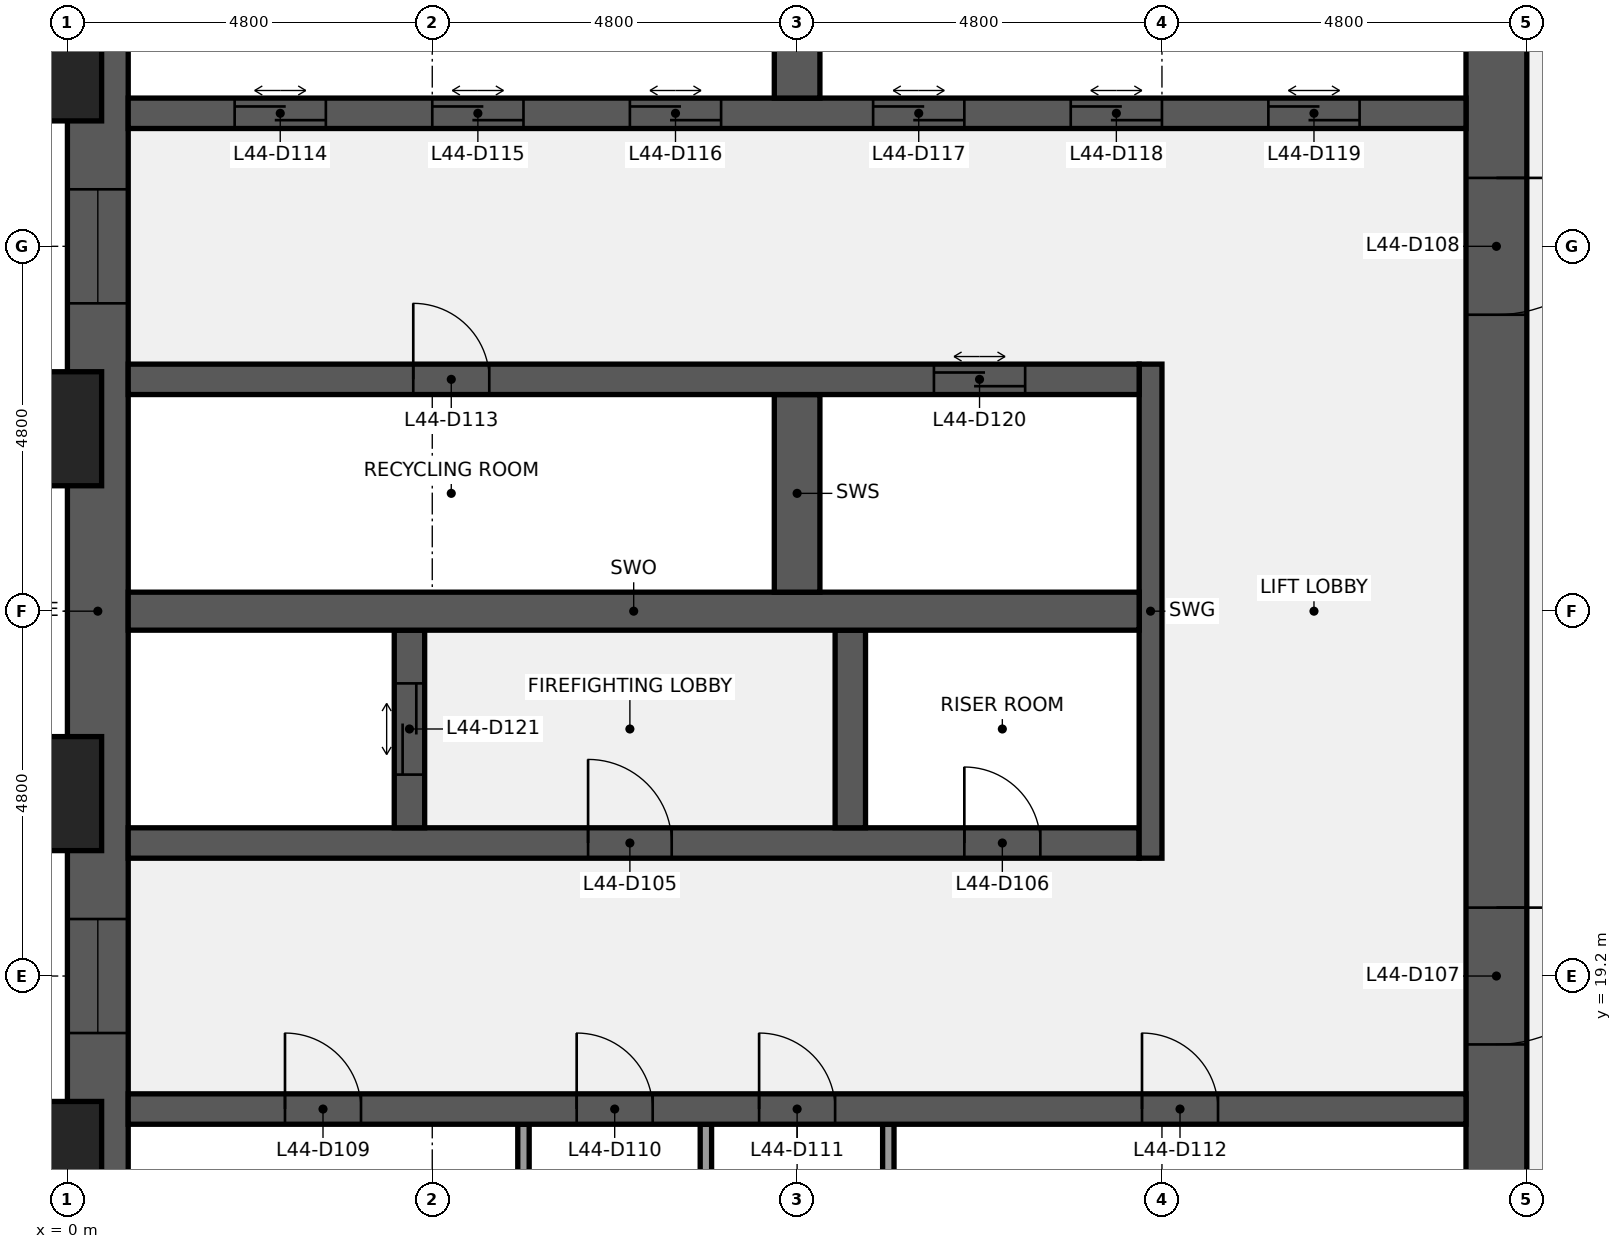
"""IFC4 building model, lengths in metres.
Left out: names, types, materials, properties, quantities, classifications, styles, units other than length and angle.
Written with IfcOpenShell. Run it as: python <this file> out.ifc"""

import sys

from ifc_helpers import new_model, si_unit, direction, frame, frame_2d, origin, origin_2d, place, context, subcontext, project, spatial, rectangle, extrude, element, fill, save


model = new_model("IFC4")
c1 = context("Model", 3, precision=1e-05, world=origin(), true_north=direction((0.0, 1.0)))
c2 = subcontext(c1, "Body", "Model", "MODEL_VIEW")
j1 = project(units=[si_unit("LENGTHUNIT", "METRE"), si_unit("PLANEANGLEUNIT", "RADIAN")], contexts=[c1])
p1 = place(None, origin())
s1 = spatial("IfcSite", under=j1, at=p1, CompositionType="ELEMENT")
p2 = place(p1, origin())
s2 = spatial("IfcBuilding", under=s1, at=p2, CompositionType="ELEMENT")
p3 = place(p2, frame((0.0, 0.0, 205.2)))
s3 = spatial("IfcBuildingStorey", under=s2, at=p3, CompositionType="ELEMENT", Elevation=205.2)
p4 = place(p3, frame((0.4, 9.6, 0.0), z_axis=(0.0, 0.0, 1.0), x_axis=(0.0, 1.0, 0.0)))
e1 = element("IfcWall", 1, at=p4, inside=s3, PredefinedType="SHEAR", context=c2, shape_type="SweptSolid", body=[
    extrude(rectangle(XDim=28.8, YDim=0.8, at=frame_2d((14.4, 0.0))), origin(), (0.0, 0.0, 1.0), 3.84),
])
p5 = place(p4, frame((8.85, 0.0, 0.9)))
e2 = element("IfcOpeningElement", 2, at=p5, cuts=e1, PredefinedType="OPENING", context=c2, shape_type="SweptSolid", body=[
    extrude(rectangle(XDim=1.5, YDim=1.5, at=frame_2d((0.75, 0.75))), frame((0.0, 0.41, 0.0), z_axis=(0.0, -1.0, 0.0), x_axis=(1.0, 0.0, 0.0)), (0.0, 0.0, 1.0), 0.82),
])
p6 = place(p4, frame((18.45, 0.0, 0.9)))
e3 = element("IfcOpeningElement", 3, at=p6, cuts=e1, PredefinedType="OPENING", context=c2, shape_type="SweptSolid", body=[
    extrude(rectangle(XDim=1.5, YDim=1.5, at=frame_2d((0.75, 0.75))), frame((0.0, 0.41, 0.0), z_axis=(0.0, -1.0, 0.0), x_axis=(1.0, 0.0, 0.0)), (0.0, 0.0, 1.0), 0.82),
])
p7 = place(p3, frame((18.8, 38.4, 0.0), z_axis=(0.0, 0.0, 1.0), x_axis=(0.0, -1.0, 0.0)))
e4 = element("IfcWall", 4, at=p7, inside=s3, PredefinedType="SHEAR", context=c2, shape_type="SweptSolid", body=[
    extrude(rectangle(XDim=28.8, YDim=0.8, at=frame_2d((14.4, 0.0))), origin(), (0.0, 0.0, 1.0), 3.84),
])
p8 = place(p7, frame((18.3, 0.0, 0.0)))
e5 = element("IfcOpeningElement", 5, at=p8, cuts=e4, PredefinedType="OPENING", context=c2, shape_type="SweptSolid", body=[
    extrude(rectangle(XDim=1.8, YDim=2.1, at=frame_2d((0.9, 1.05))), frame((0.0, 0.41, 0.0), z_axis=(0.0, -1.0, 0.0), x_axis=(1.0, 0.0, 0.0)), (0.0, 0.0, 1.0), 0.82),
])
p9 = place(p7, frame((8.7, 0.0, 0.0)))
e6 = element("IfcOpeningElement", 6, at=p9, cuts=e4, PredefinedType="OPENING", context=c2, shape_type="SweptSolid", body=[
    extrude(rectangle(XDim=1.8, YDim=2.1, at=frame_2d((0.9, 1.05))), frame((0.0, 0.41, 0.0), z_axis=(0.0, -1.0, 0.0), x_axis=(1.0, 0.0, 0.0)), (0.0, 0.0, 1.0), 0.82),
])
for number, where, z_axis, x_axis in (
    (7, (6.0, 14.65, 0.0), (0.0, 0.0, 1.0), (0.0, 1.0, 0.0)),
    (8, (8.4, 14.65, 0.0), (0.0, 0.0, 1.0), (0.0, 1.0, 0.0)),
    (9, (10.8, 14.65, 0.0), (0.0, 0.0, 1.0), (0.0, 1.0, 0.0)),
):
    element("IfcWall", number, at=place(p3, frame(where, z_axis=z_axis, x_axis=x_axis)), inside=s3, PredefinedType="PARTITIONING", context=c2, shape_type="SweptSolid", body=[
        extrude(rectangle(XDim=2.6, YDim=0.15, at=frame_2d((1.3, 0.0))), origin(), (0.0, 0.0, 1.0), 3.84),
    ])
p10 = place(p3, frame((0.8, 17.45, 0.0), z_axis=(0.0, 0.0, 1.0), x_axis=(1.0, 0.0, 0.0)))
e10 = element("IfcWall", 10, at=p10, inside=s3, PredefinedType="SHEAR", context=c2, shape_type="SweptSolid", body=[
    extrude(rectangle(XDim=17.6, YDim=0.4, at=frame_2d((8.8, 0.0))), origin(), (0.0, 0.0, 1.0), 3.84),
])
p11 = place(p10, frame((2.062, 0.0, 0.0)))
e11 = element("IfcOpeningElement", 11, at=p11, cuts=e10, PredefinedType="OPENING", context=c2, shape_type="SweptSolid", body=[
    extrude(rectangle(XDim=1.0, YDim=2.1, at=frame_2d((0.5, 1.05))), frame((0.0, 0.21, 0.0), z_axis=(0.0, -1.0, 0.0), x_axis=(1.0, 0.0, 0.0)), (0.0, 0.0, 1.0), 0.42),
])
p12 = place(p10, frame((5.9, 0.0, 0.0)))
e12 = element("IfcOpeningElement", 12, at=p12, cuts=e10, PredefinedType="OPENING", context=c2, shape_type="SweptSolid", body=[
    extrude(rectangle(XDim=1.0, YDim=2.1, at=frame_2d((0.5, 1.05))), frame((0.0, 0.21, 0.0), z_axis=(0.0, -1.0, 0.0), x_axis=(1.0, 0.0, 0.0)), (0.0, 0.0, 1.0), 0.42),
])
p13 = place(p10, frame((8.3, 0.0, 0.0)))
e13 = element("IfcOpeningElement", 13, at=p13, cuts=e10, PredefinedType="OPENING", context=c2, shape_type="SweptSolid", body=[
    extrude(rectangle(XDim=1.0, YDim=2.1, at=frame_2d((0.5, 1.05))), frame((0.0, 0.21, 0.0), z_axis=(0.0, -1.0, 0.0), x_axis=(1.0, 0.0, 0.0)), (0.0, 0.0, 1.0), 0.42),
])
p14 = place(p10, frame((13.337, 0.0, 0.0)))
e14 = element("IfcOpeningElement", 14, at=p14, cuts=e10, PredefinedType="OPENING", context=c2, shape_type="SweptSolid", body=[
    extrude(rectangle(XDim=1.0, YDim=2.1, at=frame_2d((0.5, 1.05))), frame((0.0, 0.21, 0.0), z_axis=(0.0, -1.0, 0.0), x_axis=(1.0, 0.0, 0.0)), (0.0, 0.0, 1.0), 0.42),
])
p15 = place(p3, frame((0.8, 20.95, 0.0), z_axis=(0.0, 0.0, 1.0), x_axis=(1.0, 0.0, 0.0)))
e15 = element("IfcWall", 15, at=p15, inside=s3, PredefinedType="SHEAR", context=c2, shape_type="SweptSolid", body=[
    extrude(rectangle(XDim=13.3, YDim=0.4, at=frame_2d((6.65, 0.0))), origin(), (0.0, 0.0, 1.0), 3.84),
])
p16 = place(p15, frame((6.05, 0.0, 0.0)))
e16 = element("IfcOpeningElement", 16, at=p16, cuts=e15, PredefinedType="OPENING", context=c2, shape_type="SweptSolid", body=[
    extrude(rectangle(XDim=1.1, YDim=2.1, at=frame_2d((0.55, 1.05))), frame((0.0, 0.21, 0.0), z_axis=(0.0, -1.0, 0.0), x_axis=(1.0, 0.0, 0.0)), (0.0, 0.0, 1.0), 0.42),
])
p17 = place(p15, frame((11.0, 0.0, 0.0)))
e17 = element("IfcOpeningElement", 17, at=p17, cuts=e15, PredefinedType="OPENING", context=c2, shape_type="SweptSolid", body=[
    extrude(rectangle(XDim=1.0, YDim=2.1, at=frame_2d((0.5, 1.05))), frame((0.0, 0.21, 0.0), z_axis=(0.0, -1.0, 0.0), x_axis=(1.0, 0.0, 0.0)), (0.0, 0.0, 1.0), 0.42),
])
p18 = place(p3, frame((14.25, 20.75, 0.0), z_axis=(0.0, 0.0, 1.0), x_axis=(0.0, 1.0, 0.0)))
e18 = element("IfcWall", 18, at=p18, inside=s3, PredefinedType="SHEAR", context=c2, shape_type="SweptSolid", body=[
    extrude(rectangle(XDim=6.5, YDim=0.3, at=frame_2d((3.25, 0.0))), origin(), (0.0, 0.0, 1.0), 3.84),
])
p19 = place(p3, frame((4.5, 21.15, 0.0), z_axis=(0.0, 0.0, 1.0), x_axis=(0.0, 1.0, 0.0)))
e19 = element("IfcWall", 19, at=p19, inside=s3, PredefinedType="SHEAR", context=c2, shape_type="SweptSolid", body=[
    extrude(rectangle(XDim=2.6, YDim=0.4, at=frame_2d((1.3, 0.0))), origin(), (0.0, 0.0, 1.0), 3.84),
])
p20 = place(p19, frame((0.7, 0.0, 0.0)))
e20 = element("IfcOpeningElement", 20, at=p20, cuts=e19, PredefinedType="OPENING", context=c2, shape_type="SweptSolid", body=[
    extrude(rectangle(XDim=1.2, YDim=2.1, at=frame_2d((0.6, 1.05))), frame((0.0, 0.21, 0.0), z_axis=(0.0, -1.0, 0.0), x_axis=(1.0, 0.0, 0.0)), (0.0, 0.0, 1.0), 0.42),
])
p21 = place(p3, frame((10.3, 21.15, 0.0), z_axis=(0.0, 0.0, 1.0), x_axis=(0.0, 1.0, 0.0)))
e21 = element("IfcWall", 21, at=p21, inside=s3, PredefinedType="SHEAR", context=c2, shape_type="SweptSolid", body=[
    extrude(rectangle(XDim=2.6, YDim=0.4, at=frame_2d((1.3, 0.0))), origin(), (0.0, 0.0, 1.0), 3.84),
])
p22 = place(p3, frame((0.8, 24.0, 0.0), z_axis=(0.0, 0.0, 1.0), x_axis=(1.0, 0.0, 0.0)))
e22 = element("IfcWall", 22, at=p22, inside=s3, PredefinedType="SHEAR", context=c2, shape_type="SweptSolid", body=[
    extrude(rectangle(XDim=13.3, YDim=0.5, at=frame_2d((6.65, 0.0))), origin(), (0.0, 0.0, 1.0), 3.84),
])
p23 = place(p3, frame((9.6, 24.25, 0.0), z_axis=(0.0, 0.0, 1.0), x_axis=(0.0, 1.0, 0.0)))
e23 = element("IfcWall", 23, at=p23, inside=s3, PredefinedType="SHEAR", context=c2, shape_type="SweptSolid", body=[
    extrude(rectangle(XDim=2.6, YDim=0.6, at=frame_2d((1.3, 0.0))), origin(), (0.0, 0.0, 1.0), 3.84),
])
p24 = place(p3, frame((0.8, 27.05, 0.0), z_axis=(0.0, 0.0, 1.0), x_axis=(1.0, 0.0, 0.0)))
e24 = element("IfcWall", 24, at=p24, inside=s3, PredefinedType="SHEAR", context=c2, shape_type="SweptSolid", body=[
    extrude(rectangle(XDim=13.3, YDim=0.4, at=frame_2d((6.65, 0.0))), origin(), (0.0, 0.0, 1.0), 3.84),
])
p25 = place(p24, frame((3.75, 0.0, 0.0)))
e25 = element("IfcOpeningElement", 25, at=p25, cuts=e24, PredefinedType="OPENING", context=c2, shape_type="SweptSolid", body=[
    extrude(rectangle(XDim=1.0, YDim=2.1, at=frame_2d((0.5, 1.05))), frame((0.0, 0.21, 0.0), z_axis=(0.0, -1.0, 0.0), x_axis=(1.0, 0.0, 0.0)), (0.0, 0.0, 1.0), 0.42),
])
p26 = place(p24, frame((10.6, 0.0, 0.0)))
e26 = element("IfcOpeningElement", 26, at=p26, cuts=e24, PredefinedType="OPENING", context=c2, shape_type="SweptSolid", body=[
    extrude(rectangle(XDim=1.2, YDim=2.1, at=frame_2d((0.6, 1.05))), frame((0.0, 0.21, 0.0), z_axis=(0.0, -1.0, 0.0), x_axis=(1.0, 0.0, 0.0)), (0.0, 0.0, 1.0), 0.42),
])
p27 = place(p3, frame((0.8, 30.55, 0.0), z_axis=(0.0, 0.0, 1.0), x_axis=(1.0, 0.0, 0.0)))
e27 = element("IfcWall", 27, at=p27, inside=s3, PredefinedType="SHEAR", context=c2, shape_type="SweptSolid", body=[
    extrude(rectangle(XDim=17.6, YDim=0.4, at=frame_2d((8.8, 0.0))), origin(), (0.0, 0.0, 1.0), 3.84),
])
p28 = place(p27, frame((1.4, 0.0, 0.0)))
e28 = element("IfcOpeningElement", 28, at=p28, cuts=e27, PredefinedType="OPENING", context=c2, shape_type="SweptSolid", body=[
    extrude(rectangle(XDim=1.2, YDim=2.1, at=frame_2d((0.6, 1.05))), frame((0.0, 0.21, 0.0), z_axis=(0.0, -1.0, 0.0), x_axis=(1.0, 0.0, 0.0)), (0.0, 0.0, 1.0), 0.42),
])
p29 = place(p27, frame((4.0, 0.0, 0.0)))
e29 = element("IfcOpeningElement", 29, at=p29, cuts=e27, PredefinedType="OPENING", context=c2, shape_type="SweptSolid", body=[
    extrude(rectangle(XDim=1.2, YDim=2.1, at=frame_2d((0.6, 1.05))), frame((0.0, 0.21, 0.0), z_axis=(0.0, -1.0, 0.0), x_axis=(1.0, 0.0, 0.0)), (0.0, 0.0, 1.0), 0.42),
])
p30 = place(p27, frame((6.6, 0.0, 0.0)))
e30 = element("IfcOpeningElement", 30, at=p30, cuts=e27, PredefinedType="OPENING", context=c2, shape_type="SweptSolid", body=[
    extrude(rectangle(XDim=1.2, YDim=2.1, at=frame_2d((0.6, 1.05))), frame((0.0, 0.21, 0.0), z_axis=(0.0, -1.0, 0.0), x_axis=(1.0, 0.0, 0.0)), (0.0, 0.0, 1.0), 0.42),
])
p31 = place(p27, frame((9.8, 0.0, 0.0)))
e31 = element("IfcOpeningElement", 31, at=p31, cuts=e27, PredefinedType="OPENING", context=c2, shape_type="SweptSolid", body=[
    extrude(rectangle(XDim=1.2, YDim=2.1, at=frame_2d((0.6, 1.05))), frame((0.0, 0.21, 0.0), z_axis=(0.0, -1.0, 0.0), x_axis=(1.0, 0.0, 0.0)), (0.0, 0.0, 1.0), 0.42),
])
p32 = place(p27, frame((12.4, 0.0, 0.0)))
e32 = element("IfcOpeningElement", 32, at=p32, cuts=e27, PredefinedType="OPENING", context=c2, shape_type="SweptSolid", body=[
    extrude(rectangle(XDim=1.2, YDim=2.1, at=frame_2d((0.6, 1.05))), frame((0.0, 0.21, 0.0), z_axis=(0.0, -1.0, 0.0), x_axis=(1.0, 0.0, 0.0)), (0.0, 0.0, 1.0), 0.42),
])
p33 = place(p27, frame((15.0, 0.0, 0.0)))
e33 = element("IfcOpeningElement", 33, at=p33, cuts=e27, PredefinedType="OPENING", context=c2, shape_type="SweptSolid", body=[
    extrude(rectangle(XDim=1.2, YDim=2.1, at=frame_2d((0.6, 1.05))), frame((0.0, 0.21, 0.0), z_axis=(0.0, -1.0, 0.0), x_axis=(1.0, 0.0, 0.0)), (0.0, 0.0, 1.0), 0.42),
])
p34 = place(p3, frame((9.6, 30.75, 0.0), z_axis=(0.0, 0.0, 1.0), x_axis=(0.0, 1.0, 0.0)))
e34 = element("IfcWall", 34, at=p34, inside=s3, PredefinedType="SHEAR", context=c2, shape_type="SweptSolid", body=[
    extrude(rectangle(XDim=2.6, YDim=0.6, at=frame_2d((1.3, 0.0))), origin(), (0.0, 0.0, 1.0), 3.84),
])
for number, where, z_axis, x_axis in (
    (35, (-0.75, 16.8, 0.0), (0.0, 0.0, 1.0), (0.0, 1.0, 0.0)),
    (36, (-0.75, 21.6, 0.0), (0.0, 0.0, 1.0), (0.0, 1.0, 0.0)),
    (37, (-0.75, 26.4, 0.0), (0.0, 0.0, 1.0), (0.0, 1.0, 0.0)),
    (38, (-0.75, 31.2, 0.0), (0.0, 0.0, 1.0), (0.0, 1.0, 0.0)),
):
    element("IfcColumn", number, at=place(p3, frame(where, z_axis=z_axis, x_axis=x_axis)), inside=s3, PredefinedType="PILASTER", context=c2, shape_type="SweptSolid", body=[
        extrude(rectangle(XDim=2.4, YDim=1.5, at=origin_2d()), origin(), (0.0, 0.0, 1.0), 4.0),
    ])
p35 = place(p16, origin())
e39 = element("IfcDoor", 39, at=p35, inside=s3, OperationType="SINGLE_SWING_LEFT", PredefinedType="DOOR", context=c2, shape_type="SweptSolid", body=[
    extrude(rectangle(XDim=1.1, YDim=2.1, at=frame_2d((0.55, 1.05))), frame((0.0, 0.025, 0.0), z_axis=(0.0, -1.0, 0.0), x_axis=(1.0, 0.0, 0.0)), (0.0, 0.0, 1.0), 0.05),
])
fill(e16, e39)
p36 = place(p17, origin())
e40 = element("IfcDoor", 40, at=p36, inside=s3, OperationType="SINGLE_SWING_LEFT", PredefinedType="DOOR", context=c2, shape_type="SweptSolid", body=[
    extrude(rectangle(XDim=1.0, YDim=2.1, at=frame_2d((0.5, 1.05))), frame((0.0, 0.025, 0.0), z_axis=(0.0, -1.0, 0.0), x_axis=(1.0, 0.0, 0.0)), (0.0, 0.0, 1.0), 0.05),
])
fill(e17, e40)
p37 = place(p8, origin())
e41 = element("IfcDoor", 41, at=p37, inside=s3, OperationType="DOUBLE_DOOR_SINGLE_SWING", PredefinedType="DOOR", context=c2, shape_type="SweptSolid", body=[
    extrude(rectangle(XDim=1.8, YDim=2.1, at=frame_2d((0.9, 1.05))), frame((0.0, 0.025, 0.0), z_axis=(0.0, -1.0, 0.0), x_axis=(1.0, 0.0, 0.0)), (0.0, 0.0, 1.0), 0.05),
])
fill(e5, e41)
p38 = place(p9, origin())
e42 = element("IfcDoor", 42, at=p38, inside=s3, OperationType="DOUBLE_DOOR_SINGLE_SWING", PredefinedType="DOOR", context=c2, shape_type="SweptSolid", body=[
    extrude(rectangle(XDim=1.8, YDim=2.1, at=frame_2d((0.9, 1.05))), frame((0.0, 0.025, 0.0), z_axis=(0.0, -1.0, 0.0), x_axis=(1.0, 0.0, 0.0)), (0.0, 0.0, 1.0), 0.05),
])
fill(e6, e42)
p39 = place(p11, origin())
e43 = element("IfcDoor", 43, at=p39, inside=s3, OperationType="SINGLE_SWING_LEFT", PredefinedType="DOOR", context=c2, shape_type="SweptSolid", body=[
    extrude(rectangle(XDim=1.0, YDim=2.1, at=frame_2d((0.5, 1.05))), frame((0.0, 0.025, 0.0), z_axis=(0.0, -1.0, 0.0), x_axis=(1.0, 0.0, 0.0)), (0.0, 0.0, 1.0), 0.05),
])
fill(e11, e43)
p40 = place(p12, origin())
e44 = element("IfcDoor", 44, at=p40, inside=s3, OperationType="SINGLE_SWING_LEFT", PredefinedType="DOOR", context=c2, shape_type="SweptSolid", body=[
    extrude(rectangle(XDim=1.0, YDim=2.1, at=frame_2d((0.5, 1.05))), frame((0.0, 0.025, 0.0), z_axis=(0.0, -1.0, 0.0), x_axis=(1.0, 0.0, 0.0)), (0.0, 0.0, 1.0), 0.05),
])
fill(e12, e44)
p41 = place(p13, origin())
e45 = element("IfcDoor", 45, at=p41, inside=s3, OperationType="SINGLE_SWING_LEFT", PredefinedType="DOOR", context=c2, shape_type="SweptSolid", body=[
    extrude(rectangle(XDim=1.0, YDim=2.1, at=frame_2d((0.5, 1.05))), frame((0.0, 0.025, 0.0), z_axis=(0.0, -1.0, 0.0), x_axis=(1.0, 0.0, 0.0)), (0.0, 0.0, 1.0), 0.05),
])
fill(e13, e45)
p42 = place(p14, origin())
e46 = element("IfcDoor", 46, at=p42, inside=s3, OperationType="SINGLE_SWING_LEFT", PredefinedType="DOOR", context=c2, shape_type="SweptSolid", body=[
    extrude(rectangle(XDim=1.0, YDim=2.1, at=frame_2d((0.5, 1.05))), frame((0.0, 0.025, 0.0), z_axis=(0.0, -1.0, 0.0), x_axis=(1.0, 0.0, 0.0)), (0.0, 0.0, 1.0), 0.05),
])
fill(e14, e46)
p43 = place(p25, origin())
e47 = element("IfcDoor", 47, at=p43, inside=s3, OperationType="SINGLE_SWING_LEFT", PredefinedType="DOOR", context=c2, shape_type="SweptSolid", body=[
    extrude(rectangle(XDim=1.0, YDim=2.1, at=frame_2d((0.5, 1.05))), frame((0.0, 0.025, 0.0), z_axis=(0.0, -1.0, 0.0), x_axis=(1.0, 0.0, 0.0)), (0.0, 0.0, 1.0), 0.05),
])
fill(e25, e47)
p44 = place(p28, origin())
e48 = element("IfcDoor", 48, at=p44, inside=s3, OperationType="DOUBLE_DOOR_SLIDING", PredefinedType="DOOR", context=c2, shape_type="SweptSolid", body=[
    extrude(rectangle(XDim=1.2, YDim=2.1, at=frame_2d((0.6, 1.05))), frame((0.0, 0.025, 0.0), z_axis=(0.0, -1.0, 0.0), x_axis=(1.0, 0.0, 0.0)), (0.0, 0.0, 1.0), 0.05),
])
fill(e28, e48)
p45 = place(p29, origin())
e49 = element("IfcDoor", 49, at=p45, inside=s3, OperationType="DOUBLE_DOOR_SLIDING", PredefinedType="DOOR", context=c2, shape_type="SweptSolid", body=[
    extrude(rectangle(XDim=1.2, YDim=2.1, at=frame_2d((0.6, 1.05))), frame((0.0, 0.025, 0.0), z_axis=(0.0, -1.0, 0.0), x_axis=(1.0, 0.0, 0.0)), (0.0, 0.0, 1.0), 0.05),
])
fill(e29, e49)
p46 = place(p30, origin())
e50 = element("IfcDoor", 50, at=p46, inside=s3, OperationType="DOUBLE_DOOR_SLIDING", PredefinedType="DOOR", context=c2, shape_type="SweptSolid", body=[
    extrude(rectangle(XDim=1.2, YDim=2.1, at=frame_2d((0.6, 1.05))), frame((0.0, 0.025, 0.0), z_axis=(0.0, -1.0, 0.0), x_axis=(1.0, 0.0, 0.0)), (0.0, 0.0, 1.0), 0.05),
])
fill(e30, e50)
p47 = place(p31, origin())
e51 = element("IfcDoor", 51, at=p47, inside=s3, OperationType="DOUBLE_DOOR_SLIDING", PredefinedType="DOOR", context=c2, shape_type="SweptSolid", body=[
    extrude(rectangle(XDim=1.2, YDim=2.1, at=frame_2d((0.6, 1.05))), frame((0.0, 0.025, 0.0), z_axis=(0.0, -1.0, 0.0), x_axis=(1.0, 0.0, 0.0)), (0.0, 0.0, 1.0), 0.05),
])
fill(e31, e51)
p48 = place(p32, origin())
e52 = element("IfcDoor", 52, at=p48, inside=s3, OperationType="DOUBLE_DOOR_SLIDING", PredefinedType="DOOR", context=c2, shape_type="SweptSolid", body=[
    extrude(rectangle(XDim=1.2, YDim=2.1, at=frame_2d((0.6, 1.05))), frame((0.0, 0.025, 0.0), z_axis=(0.0, -1.0, 0.0), x_axis=(1.0, 0.0, 0.0)), (0.0, 0.0, 1.0), 0.05),
])
fill(e32, e52)
p49 = place(p33, origin())
e53 = element("IfcDoor", 53, at=p49, inside=s3, OperationType="DOUBLE_DOOR_SLIDING", PredefinedType="DOOR", context=c2, shape_type="SweptSolid", body=[
    extrude(rectangle(XDim=1.2, YDim=2.1, at=frame_2d((0.6, 1.05))), frame((0.0, 0.025, 0.0), z_axis=(0.0, -1.0, 0.0), x_axis=(1.0, 0.0, 0.0)), (0.0, 0.0, 1.0), 0.05),
])
fill(e33, e53)
p50 = place(p26, origin())
e54 = element("IfcDoor", 54, at=p50, inside=s3, OperationType="DOUBLE_DOOR_SLIDING", PredefinedType="DOOR", context=c2, shape_type="SweptSolid", body=[
    extrude(rectangle(XDim=1.2, YDim=2.1, at=frame_2d((0.6, 1.05))), frame((0.0, 0.025, 0.0), z_axis=(0.0, -1.0, 0.0), x_axis=(1.0, 0.0, 0.0)), (0.0, 0.0, 1.0), 0.05),
])
fill(e26, e54)
p51 = place(p20, origin())
e55 = element("IfcDoor", 55, at=p51, inside=s3, OperationType="DOUBLE_DOOR_SLIDING", PredefinedType="DOOR", context=c2, shape_type="SweptSolid", body=[
    extrude(rectangle(XDim=1.2, YDim=2.1, at=frame_2d((0.6, 1.05))), frame((0.0, 0.025, 0.0), z_axis=(0.0, -1.0, 0.0), x_axis=(1.0, 0.0, 0.0)), (0.0, 0.0, 1.0), 0.05),
])
fill(e20, e55)
p52 = place(p5, origin())
e56 = element("IfcWindow", 56, at=p52, inside=s3, PartitioningType="SINGLE_PANEL", PredefinedType="WINDOW", context=c2, shape_type="SweptSolid", body=[
    extrude(rectangle(XDim=1.5, YDim=1.5, at=frame_2d((0.75, 0.75))), frame((0.0, 0.03, 0.0), z_axis=(0.0, -1.0, 0.0), x_axis=(1.0, 0.0, 0.0)), (0.0, 0.0, 1.0), 0.06),
])
fill(e2, e56)
p53 = place(p6, origin())
e57 = element("IfcWindow", 57, at=p53, inside=s3, PartitioningType="SINGLE_PANEL", PredefinedType="WINDOW", context=c2, shape_type="SweptSolid", body=[
    extrude(rectangle(XDim=1.5, YDim=1.5, at=frame_2d((0.75, 0.75))), frame((0.0, 0.03, 0.0), z_axis=(0.0, -1.0, 0.0), x_axis=(1.0, 0.0, 0.0)), (0.0, 0.0, 1.0), 0.06),
])
fill(e3, e57)
save(model, sys.argv[1])
